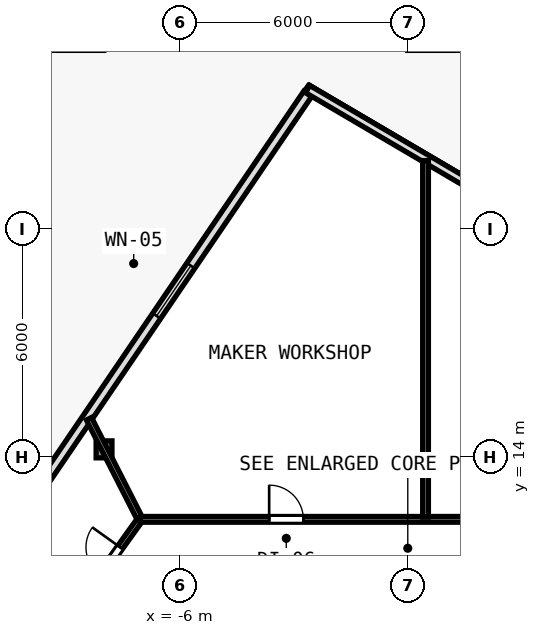
"""IFC4 building model, lengths in metres.
Left out: names, types, materials, properties, quantities, classifications, styles, units other than length and angle.
Written with IfcOpenShell. Run it as: python <this file> out.ifc"""

import sys

from ifc_helpers import new_model, si_unit, direction, frame, frame_2d, origin, origin_2d, place, context, subcontext, project, spatial, rectangle, i_section, extrude, element, fill, save


model = new_model("IFC4")
c1 = context("Model", 3, precision=1e-05, world=origin(), true_north=direction((0.0, 1.0)))
c2 = subcontext(c1, "Body", "Model", "MODEL_VIEW")
j1 = project(units=[si_unit("LENGTHUNIT", "METRE"), si_unit("PLANEANGLEUNIT", "RADIAN")], contexts=[c1])
p1 = place(None, origin())
s1 = spatial("IfcSite", under=j1, at=p1, CompositionType="ELEMENT")
p2 = place(p1, origin())
s2 = spatial("IfcBuilding", under=s1, at=p2, CompositionType="ELEMENT")
p3 = place(p2, frame((0.0, 0.0, 26.4)))
s3 = spatial("IfcBuildingStorey", under=s2, at=p3, CompositionType="ELEMENT", Elevation=26.4)
p4 = place(p3, frame((-7.992, 14.202, 0.015), z_axis=(0.008798483968, -0.002591801479, 0.999957933738), x_axis=(0.282568886397, 0.959247009086, 0.0)))
e1 = element("IfcColumn", 1, at=p4, inside=s3, PredefinedType="COLUMN", context=c2, shape_type="SweptSolid", body=[
    extrude(i_section(OverallWidth=0.416, OverallDepth=0.446, WebThickness=0.025, FlangeThickness=0.04, FilletRadius=0.015, at=origin_2d()), origin(), (0.0, 0.0, 1.0), 3.58),
])
p5 = place(p3, frame((-9.684, 13.191, 0.0), z_axis=(0.0, 0.0, 1.0), x_axis=(0.562473549685, 0.826815279192, 0.0)))
e2 = element("IfcWall", 2, at=p5, inside=s3, PredefinedType="SOLIDWALL", context=c2, shape_type="SweptSolid", body=[
    extrude(rectangle(XDim=12.536, YDim=0.25, at=frame_2d((6.268, 0.0))), origin(), (0.0, 0.0, 1.0), 3.35),
])
p6 = place(p5, frame((5.468, 0.0, 0.62)))
e3 = element("IfcOpeningElement", 3, at=p6, cuts=e2, PredefinedType="OPENING", context=c2, shape_type="SweptSolid", body=[
    extrude(rectangle(XDim=1.6, YDim=2.1, at=frame_2d((0.8, 1.05))), frame((0.0, 0.135, 0.0), z_axis=(0.0, -1.0, 0.0), x_axis=(1.0, 0.0, 0.0)), (0.0, 0.0, 1.0), 0.27),
])
p7 = place(p3, frame((-2.635, 23.681, 0.0), z_axis=(0.0, 0.0, 1.0), x_axis=(0.862126841454, -0.506692519428, 0.0)))
e4 = element("IfcWall", 4, at=p7, inside=s3, PredefinedType="SOLIDWALL", context=c2, shape_type="SweptSolid", body=[
    extrude(rectangle(XDim=5.439, YDim=0.22, at=frame_2d((2.72, 0.0))), origin(), (0.0, 0.0, 1.0), 3.35),
])
p8 = place(p3, frame((-9.86, 8.426, 0.0), z_axis=(0.0, 0.0, 1.0), x_axis=(0.582449511476, 0.812866881218, 0.0)))
e5 = element("IfcWall", 5, at=p8, inside=s3, PredefinedType="PARTITIONING", context=c2, shape_type="SweptSolid", body=[
    extrude(rectangle(XDim=4.84, YDim=0.15, at=frame_2d((2.42, 0.0))), origin(), (0.0, 0.0, 1.0), 2.725),
])
p9 = place(p8, frame((3.035, 0.0, 0.0)))
e6 = element("IfcOpeningElement", 6, at=p9, cuts=e5, PredefinedType="OPENING", context=c2, shape_type="SweptSolid", body=[
    extrude(rectangle(XDim=0.9, YDim=2.1, at=frame_2d((0.45, 1.05))), frame((0.0, 0.085, 0.0), z_axis=(0.0, -1.0, 0.0), x_axis=(1.0, 0.0, 0.0)), (0.0, 0.0, 1.0), 0.17),
])
p10 = place(p3, frame((-7.041, 12.36, 0.0), z_axis=(0.0, 0.0, 1.0), x_axis=(1.0, 0.0, 0.0)))
e7 = element("IfcWall", 7, at=p10, inside=s3, PredefinedType="PARTITIONING", context=c2, shape_type="SweptSolid", body=[
    extrude(rectangle(XDim=14.082, YDim=0.15, at=frame_2d((7.041, 0.0))), origin(), (0.0, 0.0, 1.0), 3.35),
])
p11 = place(p10, frame((10.256, 0.0, 0.0)))
e8 = element("IfcOpeningElement", 8, at=p11, cuts=e7, PredefinedType="OPENING", context=c2, shape_type="SweptSolid", body=[
    extrude(rectangle(XDim=0.9, YDim=2.1, at=frame_2d((0.45, 1.05))), frame((0.0, 0.085, 0.0), z_axis=(0.0, -1.0, 0.0), x_axis=(1.0, 0.0, 0.0)), (0.0, 0.0, 1.0), 0.17),
])
p12 = place(p10, frame((3.393, 0.0, 0.0)))
e9 = element("IfcOpeningElement", 9, at=p12, cuts=e7, PredefinedType="OPENING", context=c2, shape_type="SweptSolid", body=[
    extrude(rectangle(XDim=0.9, YDim=2.1, at=frame_2d((0.45, 1.05))), frame((0.0, 0.085, 0.0), z_axis=(0.0, -1.0, 0.0), x_axis=(1.0, 0.0, 0.0)), (0.0, 0.0, 1.0), 0.17),
])
p13 = place(p3, frame((-7.064, 12.404, 0.0), z_axis=(0.0, 0.0, 1.0), x_axis=(-0.453724092979, 0.891142215053, 0.0)))
e10 = element("IfcWall", 10, at=p13, inside=s3, PredefinedType="PARTITIONING", context=c2, shape_type="SweptSolid", body=[
    extrude(rectangle(XDim=2.92, YDim=0.15, at=frame_2d((1.46, 0.0))), origin(), (0.0, 0.0, 1.0), 2.725),
])
p14 = place(p3, frame((0.468, 12.42, 0.0), z_axis=(0.0, 0.0, 1.0), x_axis=(0.0, 1.0, 0.0)))
e11 = element("IfcWall", 11, at=p14, inside=s3, PredefinedType="PARTITIONING", context=c2, shape_type="SweptSolid", body=[
    extrude(rectangle(XDim=9.38, YDim=0.15, at=frame_2d((4.69, 0.0))), origin(), (0.0, 0.0, 1.0), 2.735),
])
p15 = place(p6, origin())
e12 = element("IfcWindow", 12, at=p15, inside=s3, PartitioningType="SINGLE_PANEL", PredefinedType="WINDOW", context=c2, shape_type="SweptSolid", body=[
    extrude(rectangle(XDim=1.6, YDim=2.1, at=frame_2d((0.8, 1.05))), frame((0.0, 0.03, 0.0), z_axis=(0.0, -1.0, 0.0), x_axis=(1.0, 0.0, 0.0)), (0.0, 0.0, 1.0), 0.06),
])
fill(e3, e12)
p16 = place(p12, origin())
e13 = element("IfcDoor", 13, at=p16, inside=s3, OperationType="SINGLE_SWING_LEFT", PredefinedType="DOOR", context=c2, shape_type="SweptSolid", body=[
    extrude(rectangle(XDim=0.9, YDim=2.1, at=frame_2d((0.45, 1.05))), frame((0.0, 0.025, 0.0), z_axis=(0.0, -1.0, 0.0), x_axis=(1.0, 0.0, 0.0)), (0.0, 0.0, 1.0), 0.05),
])
fill(e9, e13)
p17 = place(p9, origin())
e14 = element("IfcDoor", 14, at=p17, inside=s3, OperationType="SINGLE_SWING_RIGHT", PredefinedType="DOOR", context=c2, shape_type="SweptSolid", body=[
    extrude(rectangle(XDim=0.9, YDim=2.1, at=frame_2d((0.45, 1.05))), frame((0.0, 0.025, 0.0), z_axis=(0.0, -1.0, 0.0), x_axis=(1.0, 0.0, 0.0)), (0.0, 0.0, 1.0), 0.05),
])
fill(e6, e14)
save(model, sys.argv[1])
